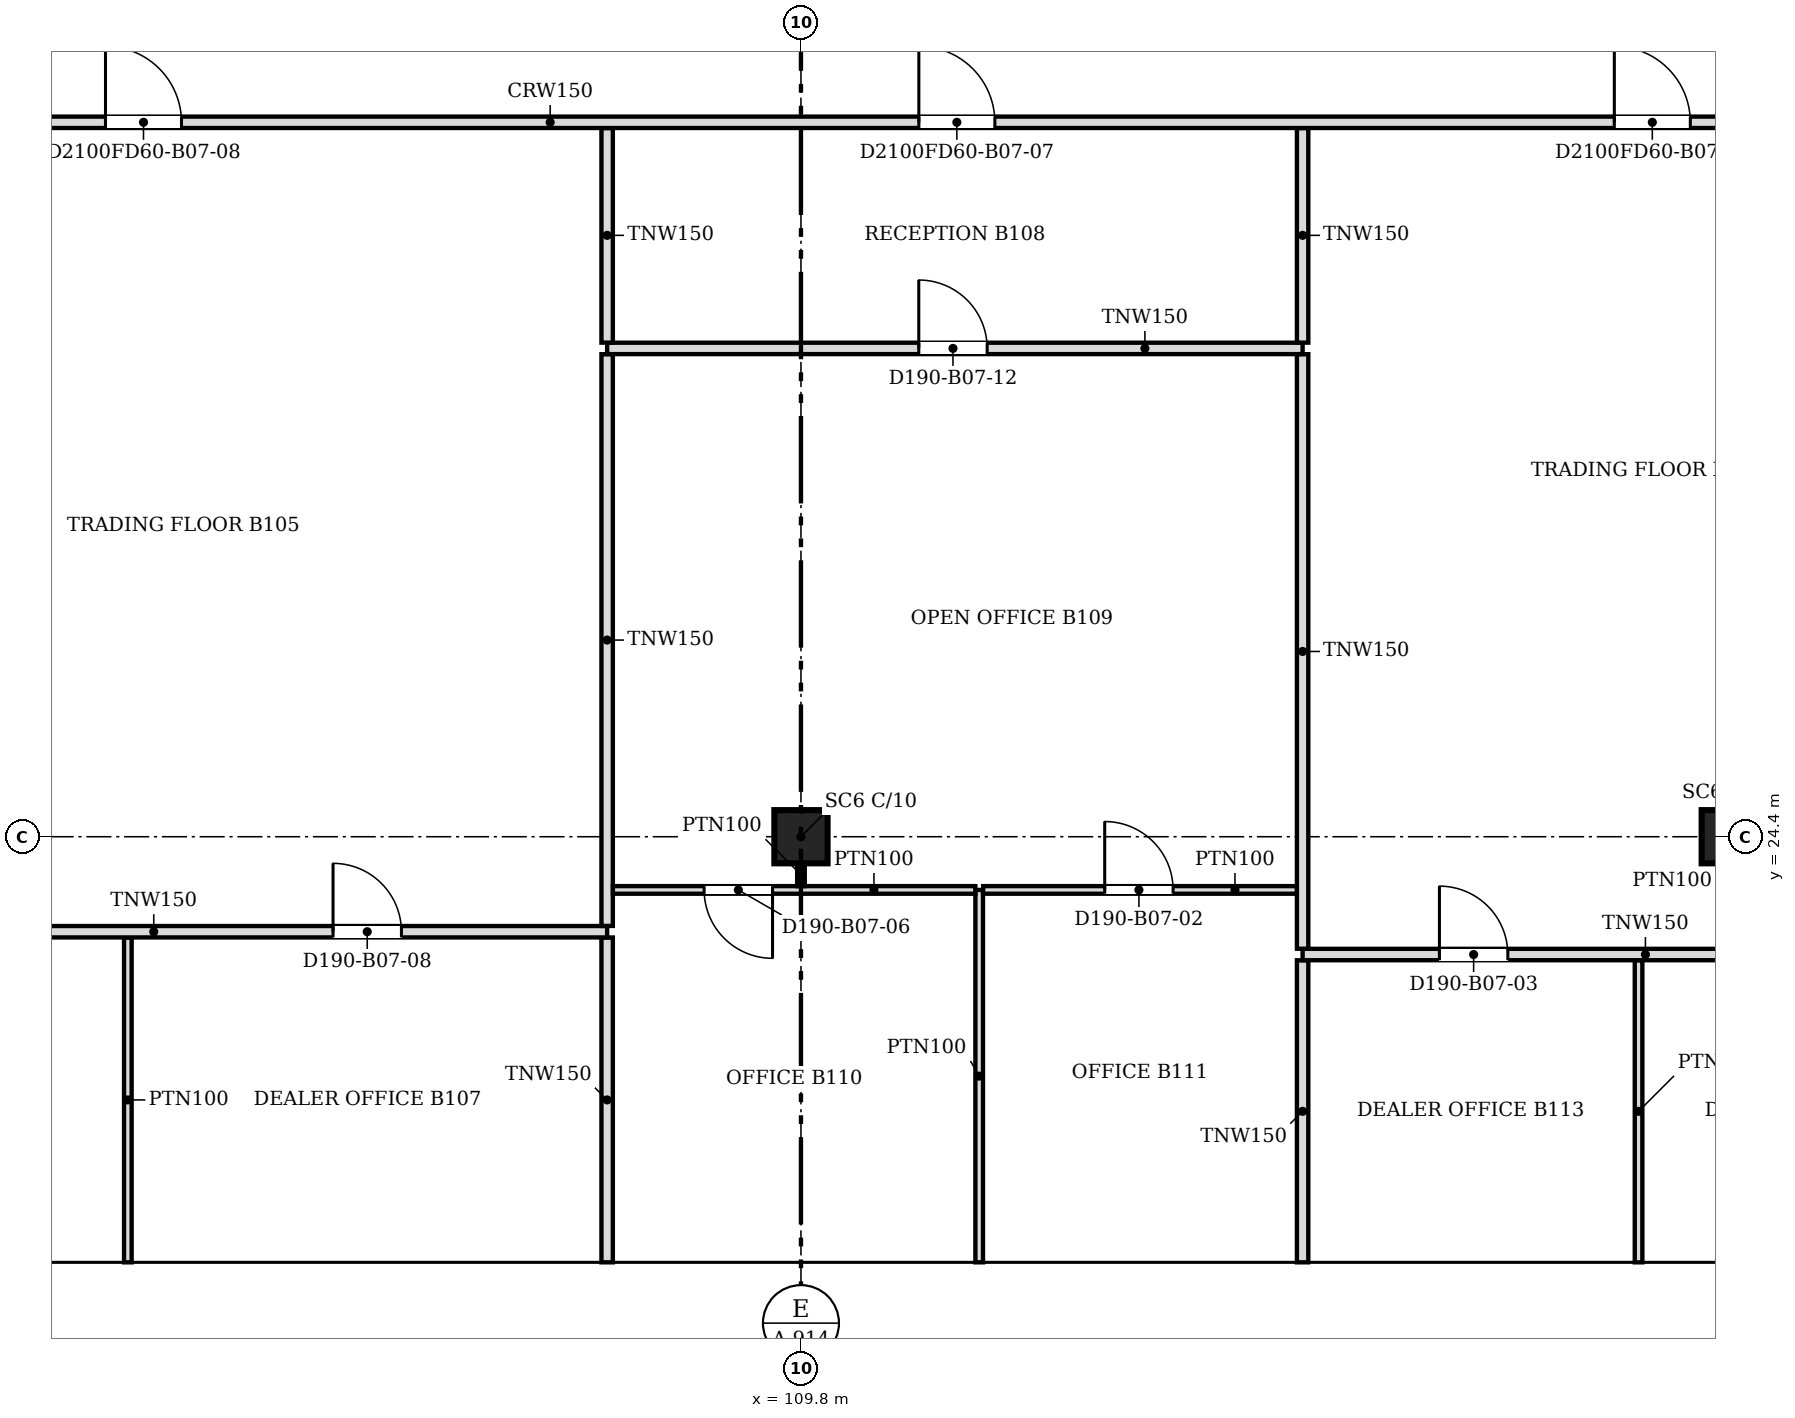
"""IFC4 building model, lengths in metres.
Left out: names, types, materials, properties, quantities, classifications, styles, units other than length and angle.
Written with IfcOpenShell. Run it as: python <this file> out.ifc"""

import sys

from ifc_helpers import new_model, si_unit, direction, frame, frame_2d, origin, origin_2d, place, context, subcontext, project, spatial, polyline, rectangle, outline, extrude, faceted_brep, source, transform, mapped, element, fill, save


model = new_model("IFC4")
c1 = context("Model", 3, precision=1e-05, world=origin(), true_north=direction((0.0, 1.0)))
c2 = subcontext(c1, "Body", "Model", "MODEL_VIEW")
j1 = project(units=[si_unit("LENGTHUNIT", "METRE"), si_unit("PLANEANGLEUNIT", "RADIAN")], contexts=[c1])
p1 = place(None, origin())
s1 = spatial("IfcSite", under=j1, at=p1, CompositionType="ELEMENT")
p2 = place(p1, origin())
s2 = spatial("IfcBuilding", under=s1, at=p2, CompositionType="ELEMENT")
p3 = place(p2, frame((0.0, 0.0, 68.6)))
s3 = spatial("IfcBuildingStorey", under=s2, at=p3, CompositionType="ELEMENT", Elevation=68.6)
for number, where, z_axis, x_axis in (
    (1, (109.8, 24.4, 0.0), (0.0, 0.0, 1.0), (1.0, 0.0, 0.0)),
    (2, (122.0, 24.4, 0.0), (0.0, 0.0, 1.0), (1.0, 0.0, 0.0)),
):
    element("IfcColumn", number, at=place(p3, frame(where, z_axis=z_axis, x_axis=x_axis)), inside=s3, PredefinedType="COLUMN", context=c2, shape_type="SweptSolid", body=[
        extrude(rectangle(XDim=0.7, YDim=0.7, at=origin_2d()), origin(), (0.0, 0.0, 1.0), 3.6),
    ])
m1 = source(origin(), c2, "Body", "Brep", [
    faceted_brep([(6.1, -0.25, 0.0), (3.05, -0.25, 3.8), (0.0, -0.25, 0.0), (6.1, -0.25, 0.0), (0.0, 0.25, 0.0), (3.05, 0.25, 3.8), (6.1, 0.25, 0.0), (6.1, 0.25, 0.0)], [[[0, 1, 2, 3]], [[4, 5, 6, 7]], [[6, 5, 1, 0]], [[5, 4, 2, 1]], [[4, 7, 3, 2]], [[3, 7, 6, 0]]]),
])
p4 = place(p3, frame((94.55, 18.55, 0.0), z_axis=(0.0, 0.0, 1.0), x_axis=(1.0, 0.0, 0.0)))
e3 = element("IfcWall", 3, at=p4, inside=s3, PredefinedType="SOLIDWALL", context=c2, shape_type="MappedRepresentation", body=[
    mapped(m1, transform((0.0, 0.0, 0.0), scale=1.0)),
])
m2 = source(origin(), c2, "Body", "SweptSolid", [
    extrude(outline(polyline([(5.579, 0.25), (3.05, 3.4), (0.521, 0.25), (5.579, 0.25)])), frame((0.0, 0.26, 0.0), z_axis=(0.0, -1.0, 0.0), x_axis=(1.0, 0.0, 0.0)), (0.0, 0.0, 1.0), 0.52),
])
p5 = place(p4, origin())
e4 = element("IfcOpeningElement", 4, at=p5, cuts=e3, PredefinedType="OPENING", context=c2, shape_type="MappedRepresentation", body=[
    mapped(m2, transform((0.0, 0.0, 0.0), scale=1.0)),
])
m3 = source(origin(), c2, "Body", "SweptSolid", [
    extrude(outline(polyline([(6.1, 0.0), (3.05, 3.8), (0.0, 0.0), (6.1, 0.0)])), frame((0.0, 0.25, 0.0), z_axis=(0.0, -1.0, 0.0), x_axis=(1.0, 0.0, 0.0)), (0.0, 0.0, 1.0), 0.5),
])
p6 = place(p3, frame((100.65, 18.55, 0.0), z_axis=(0.0, 0.0, 1.0), x_axis=(1.0, 0.0, 0.0)))
e5 = element("IfcWall", 5, at=p6, inside=s3, PredefinedType="SOLIDWALL", context=c2, shape_type="MappedRepresentation", body=[
    mapped(m3, transform((0.0, 0.0, 0.0), scale=1.0)),
])
p7 = place(p6, origin())
e6 = element("IfcOpeningElement", 6, at=p7, cuts=e5, PredefinedType="OPENING", context=c2, shape_type="MappedRepresentation", body=[
    mapped(m2, transform((0.0, 0.0, 0.0), scale=1.0)),
])
p8 = place(p3, frame((106.75, 18.55, 0.0), z_axis=(0.0, 0.0, 1.0), x_axis=(1.0, 0.0, 0.0)))
e7 = element("IfcWall", 7, at=p8, inside=s3, PredefinedType="SOLIDWALL", context=c2, shape_type="MappedRepresentation", body=[
    mapped(m3, transform((0.0, 0.0, 0.0), scale=1.0)),
])
p9 = place(p8, origin())
e8 = element("IfcOpeningElement", 8, at=p9, cuts=e7, PredefinedType="OPENING", context=c2, shape_type="MappedRepresentation", body=[
    mapped(m2, transform((0.0, 0.0, 0.0), scale=1.0)),
])
p10 = place(p3, frame((112.85, 18.55, 0.0), z_axis=(0.0, 0.0, 1.0), x_axis=(1.0, 0.0, 0.0)))
e9 = element("IfcWall", 9, at=p10, inside=s3, PredefinedType="SOLIDWALL", context=c2, shape_type="MappedRepresentation", body=[
    mapped(m1, transform((0.0, 0.0, 0.0), scale=1.0)),
])
p11 = place(p10, origin())
e10 = element("IfcOpeningElement", 10, at=p11, cuts=e9, PredefinedType="OPENING", context=c2, shape_type="MappedRepresentation", body=[
    mapped(m2, transform((0.0, 0.0, 0.0), scale=1.0)),
])
p12 = place(p3, frame((118.95, 18.55, 0.0), z_axis=(0.0, 0.0, 1.0), x_axis=(1.0, 0.0, 0.0)))
e11 = element("IfcWall", 11, at=p12, inside=s3, PredefinedType="SOLIDWALL", context=c2, shape_type="MappedRepresentation", body=[
    mapped(m3, transform((0.0, 0.0, 0.0), scale=1.0)),
])
p13 = place(p12, origin())
e12 = element("IfcOpeningElement", 12, at=p13, cuts=e11, PredefinedType="OPENING", context=c2, shape_type="MappedRepresentation", body=[
    mapped(m2, transform((0.0, 0.0, 0.0), scale=1.0)),
])
p14 = place(p2, frame((0.0, 0.0, 72.4)))
s4 = spatial("IfcBuildingStorey", under=s2, at=p14, CompositionType="ELEMENT", Elevation=72.4)
m4 = source(origin(), c2, "Body", "Brep", [
    faceted_brep([(3.05, -0.25, 0.0), (6.1, -0.25, 3.8), (6.1, -0.25, 3.8), (3.05, -0.25, 7.6), (0.0, -0.25, 3.8), (0.0, 0.25, 3.8), (3.05, 0.25, 7.6), (6.1, 0.25, 3.8), (6.1, 0.25, 3.8), (3.05, 0.25, 0.0)], [[[0, 1, 2, 3, 4]], [[5, 6, 7, 8, 9]], [[9, 8, 1, 0]], [[7, 6, 3, 2]], [[6, 5, 4, 3]], [[5, 9, 0, 4]], [[1, 8, 7, 2]]]),
])
p15 = place(p14, frame((97.6, 18.55, -3.8), z_axis=(0.0, 0.0, 1.0), x_axis=(1.0, 0.0, 0.0)))
e13 = element("IfcWall", 13, at=p15, inside=s4, PredefinedType="SOLIDWALL", context=c2, shape_type="MappedRepresentation", body=[
    mapped(m4, transform((0.0, 0.0, 0.0), scale=1.0)),
])
m5 = source(origin(), c2, "Body", "SweptSolid", [
    extrude(outline(polyline([(3.05, 0.399), (5.78, 3.8), (3.05, 7.2), (0.321, 3.8), (3.05, 0.399)])), frame((0.0, 0.26, 0.0), z_axis=(0.0, -1.0, 0.0), x_axis=(1.0, 0.0, 0.0)), (0.0, 0.0, 1.0), 0.52),
])
p16 = place(p15, origin())
e14 = element("IfcOpeningElement", 14, at=p16, cuts=e13, PredefinedType="OPENING", context=c2, shape_type="MappedRepresentation", body=[
    mapped(m5, transform((0.0, 0.0, 0.0), scale=1.0)),
])
m6 = source(origin(), c2, "Body", "SweptSolid", [
    extrude(outline(polyline([(3.05, 0.0), (6.1, 3.8), (3.05, 7.6), (0.0, 3.8), (3.05, 0.0)])), frame((0.0, 0.25, 0.0), z_axis=(0.0, -1.0, 0.0), x_axis=(1.0, 0.0, 0.0)), (0.0, 0.0, 1.0), 0.5),
])
p17 = place(p14, frame((103.7, 18.55, -3.8), z_axis=(0.0, 0.0, 1.0), x_axis=(1.0, 0.0, 0.0)))
e15 = element("IfcWall", 15, at=p17, inside=s4, PredefinedType="SOLIDWALL", context=c2, shape_type="MappedRepresentation", body=[
    mapped(m6, transform((0.0, 0.0, 0.0), scale=1.0)),
])
p18 = place(p17, origin())
e16 = element("IfcOpeningElement", 16, at=p18, cuts=e15, PredefinedType="OPENING", context=c2, shape_type="MappedRepresentation", body=[
    mapped(m5, transform((0.0, 0.0, 0.0), scale=1.0)),
])
p19 = place(p14, frame((109.8, 18.55, -3.8), z_axis=(0.0, 0.0, 1.0), x_axis=(1.0, 0.0, 0.0)))
e17 = element("IfcWall", 17, at=p19, inside=s4, PredefinedType="SOLIDWALL", context=c2, shape_type="MappedRepresentation", body=[
    mapped(m4, transform((0.0, 0.0, 0.0), scale=1.0)),
])
p20 = place(p19, origin())
e18 = element("IfcOpeningElement", 18, at=p20, cuts=e17, PredefinedType="OPENING", context=c2, shape_type="MappedRepresentation", body=[
    mapped(m5, transform((0.0, 0.0, 0.0), scale=1.0)),
])
p21 = place(p14, frame((115.9, 18.55, -3.8), z_axis=(0.0, 0.0, 1.0), x_axis=(1.0, 0.0, 0.0)))
e19 = element("IfcWall", 19, at=p21, inside=s4, PredefinedType="SOLIDWALL", context=c2, shape_type="MappedRepresentation", body=[
    mapped(m6, transform((0.0, 0.0, 0.0), scale=1.0)),
])
p22 = place(p21, origin())
e20 = element("IfcOpeningElement", 20, at=p22, cuts=e19, PredefinedType="OPENING", context=c2, shape_type="MappedRepresentation", body=[
    mapped(m5, transform((0.0, 0.0, 0.0), scale=1.0)),
])
p23 = place(p3, frame((100.944, 18.8, 0.0), z_axis=(0.0, 0.0, 1.0), x_axis=(0.0, 1.0, 0.0)))
e21 = element("IfcWall", 21, at=p23, inside=s3, PredefinedType="PARTITIONING", context=c2, shape_type="SweptSolid", body=[
    extrude(rectangle(XDim=4.274, YDim=0.1, at=frame_2d((2.137, 0.0))), origin(), (0.0, 0.0, 1.0), 3.067),
])
p24 = place(p3, frame((107.25, 18.8, 0.0), z_axis=(0.0, 0.0, 1.0), x_axis=(0.0, 1.0, 0.0)))
e22 = element("IfcWall", 22, at=p24, inside=s3, PredefinedType="PARTITIONING", context=c2, shape_type="SweptSolid", body=[
    extrude(rectangle(XDim=4.274, YDim=0.15, at=frame_2d((2.137, 0.0))), origin(), (0.0, 0.0, 1.0), 3.067),
])
p25 = place(p3, frame((112.145, 18.8, 0.0), z_axis=(0.0, 0.0, 1.0), x_axis=(0.0, 1.0, 0.0)))
e23 = element("IfcWall", 23, at=p25, inside=s3, PredefinedType="PARTITIONING", context=c2, shape_type="SweptSolid", body=[
    extrude(rectangle(XDim=4.9, YDim=0.1, at=frame_2d((2.45, 0.0))), origin(), (0.0, 0.0, 1.0), 3.067),
])
p26 = place(p3, frame((116.4, 18.8, 0.0), z_axis=(0.0, 0.0, 1.0), x_axis=(0.0, 1.0, 0.0)))
e24 = element("IfcWall", 24, at=p26, inside=s3, PredefinedType="PARTITIONING", context=c2, shape_type="SweptSolid", body=[
    extrude(rectangle(XDim=3.974, YDim=0.15, at=frame_2d((1.987, 0.0))), origin(), (0.0, 0.0, 1.0), 3.067),
])
p27 = place(p3, frame((120.82, 18.8, 0.0), z_axis=(0.0, 0.0, 1.0), x_axis=(0.0, 1.0, 0.0)))
e25 = element("IfcWall", 25, at=p27, inside=s3, PredefinedType="PARTITIONING", context=c2, shape_type="SweptSolid", body=[
    extrude(rectangle(XDim=3.974, YDim=0.1, at=frame_2d((1.987, 0.0))), origin(), (0.0, 0.0, 1.0), 3.067),
])
p28 = place(p3, frame((125.55, 22.85, 0.0), z_axis=(0.0, 0.0, 1.0), x_axis=(-1.0, 0.0, 0.0)))
e26 = element("IfcWall", 26, at=p28, inside=s3, PredefinedType="PARTITIONING", context=c2, shape_type="SweptSolid", body=[
    extrude(rectangle(XDim=9.15, YDim=0.15, at=frame_2d((4.575, 0.0))), origin(), (0.0, 0.0, 1.0), 3.067),
])
m7 = source(origin(), c2, "Body", "SweptSolid", [
    extrude(rectangle(XDim=0.9, YDim=2.1, at=frame_2d((0.45, 1.05))), frame((0.0, 0.085, 0.0), z_axis=(0.0, -1.0, 0.0), x_axis=(1.0, 0.0, 0.0)), (0.0, 0.0, 1.0), 0.17),
])
p29 = place(p28, frame((6.45, 0.0, 0.0)))
e27 = element("IfcOpeningElement", 27, at=p29, cuts=e26, PredefinedType="OPENING", context=c2, shape_type="MappedRepresentation", body=[
    mapped(m7, transform((0.0, 0.0, 0.0), scale=1.0)),
])
p30 = place(p28, frame((1.93, 0.0, 0.0)))
e28 = element("IfcOpeningElement", 28, at=p30, cuts=e26, PredefinedType="OPENING", context=c2, shape_type="MappedRepresentation", body=[
    mapped(m7, transform((0.0, 0.0, 0.0), scale=1.0)),
])
p31 = place(p3, frame((116.4, 22.926, 0.0), z_axis=(0.0, 0.0, 1.0), x_axis=(0.0, 1.0, 0.0)))
e29 = element("IfcWall", 29, at=p31, inside=s3, PredefinedType="PARTITIONING", context=c2, shape_type="SweptSolid", body=[
    extrude(rectangle(XDim=7.823, YDim=0.15, at=frame_2d((3.912, 0.0))), origin(), (0.0, 0.0, 1.0), 3.067),
])
p32 = place(p3, frame((107.25, 23.15, 0.0), z_axis=(0.0, 0.0, 1.0), x_axis=(-1.0, 0.0, 0.0)))
e30 = element("IfcWall", 30, at=p32, inside=s3, PredefinedType="PARTITIONING", context=c2, shape_type="SweptSolid", body=[
    extrude(rectangle(XDim=12.124, YDim=0.15, at=frame_2d((6.062, 0.0))), origin(), (0.0, 0.0, 1.0), 3.067),
])
p33 = place(p32, frame((8.324, 0.0, 0.0)))
e31 = element("IfcOpeningElement", 31, at=p33, cuts=e30, PredefinedType="OPENING", context=c2, shape_type="MappedRepresentation", body=[
    mapped(m7, transform((0.0, 0.0, 0.0), scale=1.0)),
])
p34 = place(p32, frame((2.706, 0.0, 0.0)))
e32 = element("IfcOpeningElement", 32, at=p34, cuts=e30, PredefinedType="OPENING", context=c2, shape_type="MappedRepresentation", body=[
    mapped(m7, transform((0.0, 0.0, 0.0), scale=1.0)),
])
p35 = place(p3, frame((107.25, 23.226, 0.0), z_axis=(0.0, 0.0, 1.0), x_axis=(0.0, 1.0, 0.0)))
e33 = element("IfcWall", 33, at=p35, inside=s3, PredefinedType="PARTITIONING", context=c2, shape_type="SweptSolid", body=[
    extrude(rectangle(XDim=7.523, YDim=0.15, at=frame_2d((3.761, 0.0))), origin(), (0.0, 0.0, 1.0), 3.067),
])
p36 = place(p3, frame((112.094, 23.7, 0.0), z_axis=(0.0, 0.0, 1.0), x_axis=(-1.0, 0.0, 0.0)))
e34 = element("IfcWall", 34, at=p36, inside=s3, PredefinedType="PARTITIONING", context=c2, shape_type="SweptSolid", body=[
    extrude(rectangle(XDim=4.768, YDim=0.1, at=frame_2d((2.384, 0.0))), origin(), (0.0, 0.0, 1.0), 3.067),
])
m8 = source(origin(), c2, "Body", "SweptSolid", [
    extrude(rectangle(XDim=0.9, YDim=2.1, at=frame_2d((0.45, 1.05))), frame((0.0, 0.06, 0.0), z_axis=(0.0, -1.0, 0.0), x_axis=(1.0, 0.0, 0.0)), (0.0, 0.0, 1.0), 0.12),
])
p37 = place(p36, frame((2.668, 0.0, 0.0)))
e35 = element("IfcOpeningElement", 35, at=p37, cuts=e34, PredefinedType="OPENING", context=c2, shape_type="MappedRepresentation", body=[
    mapped(m8, transform((0.0, 0.0, 0.0), scale=1.0)),
])
p38 = place(p3, frame((116.324, 23.7, 0.0), z_axis=(0.0, 0.0, 1.0), x_axis=(-1.0, 0.0, 0.0)))
e36 = element("IfcWall", 36, at=p38, inside=s3, PredefinedType="PARTITIONING", context=c2, shape_type="SweptSolid", body=[
    extrude(rectangle(XDim=4.128, YDim=0.1, at=frame_2d((2.064, 0.0))), origin(), (0.0, 0.0, 1.0), 3.067),
])
p39 = place(p38, frame((1.628, 0.0, 0.0)))
e37 = element("IfcOpeningElement", 37, at=p39, cuts=e36, PredefinedType="OPENING", context=c2, shape_type="MappedRepresentation", body=[
    mapped(m8, transform((0.0, 0.0, 0.0), scale=1.0)),
])
p40 = place(p3, frame((109.8, 24.05, 0.0), z_axis=(0.0, 0.0, 1.0), x_axis=(0.0, -1.0, 0.0)))
e38 = element("IfcWall", 38, at=p40, inside=s3, PredefinedType="PARTITIONING", context=c2, shape_type="SweptSolid", body=[
    extrude(rectangle(XDim=0.3, YDim=0.1, at=frame_2d((0.15, 0.0))), origin(), (0.0, 0.0, 1.0), 3.067),
])
p41 = place(p3, frame((116.4, 30.825, 0.0), z_axis=(0.0, 0.0, 1.0), x_axis=(-1.0, 0.0, 0.0)))
e39 = element("IfcWall", 39, at=p41, inside=s3, PredefinedType="PARTITIONING", context=c2, shape_type="SweptSolid", body=[
    extrude(rectangle(XDim=9.15, YDim=0.15, at=frame_2d((4.575, 0.0))), origin(), (0.0, 0.0, 1.0), 3.067),
])
p42 = place(p41, frame((4.15, 0.0, 0.0)))
e40 = element("IfcOpeningElement", 40, at=p42, cuts=e39, PredefinedType="OPENING", context=c2, shape_type="MappedRepresentation", body=[
    mapped(m7, transform((0.0, 0.0, 0.0), scale=1.0)),
])
for number, where, z_axis, x_axis in (
    (41, (107.25, 30.901, 0.0), (0.0, 0.0, 1.0), (0.0, 1.0, 0.0)),
    (42, (116.4, 30.901, 0.0), (0.0, 0.0, 1.0), (0.0, 1.0, 0.0)),
):
    element("IfcWall", number, at=place(p3, frame(where, z_axis=z_axis, x_axis=x_axis)), inside=s3, PredefinedType="PARTITIONING", context=c2, shape_type="SweptSolid", body=[
        extrude(rectangle(XDim=2.823, YDim=0.15, at=frame_2d((1.412, 0.0))), origin(), (0.0, 0.0, 1.0), 3.067),
    ])
p43 = place(p3, frame((133.7, 33.8, 0.0), z_axis=(0.0, 0.0, 1.0), x_axis=(-1.0, 0.0, 0.0)))
e43 = element("IfcWall", 43, at=p43, inside=s3, PredefinedType="PARTITIONING", context=c2, shape_type="SweptSolid", body=[
    extrude(rectangle(XDim=47.8, YDim=0.15, at=frame_2d((23.9, 0.0))), origin(), (0.0, 0.0, 1.0), 3.067),
])
m9 = source(origin(), c2, "Body", "SweptSolid", [
    extrude(rectangle(XDim=1.0, YDim=2.1, at=frame_2d((0.5, 1.05))), frame((0.0, 0.085, 0.0), z_axis=(0.0, -1.0, 0.0), x_axis=(1.0, 0.0, 0.0)), (0.0, 0.0, 1.0), 0.17),
])
p44 = place(p43, frame((3.549, 0.0, 0.0)))
e44 = element("IfcOpeningElement", 44, at=p44, cuts=e43, PredefinedType="OPENING", context=c2, shape_type="MappedRepresentation", body=[
    mapped(m9, transform((0.0, 0.0, 0.0), scale=1.0)),
])
p45 = place(p43, frame((42.7, 0.0, 0.0)))
e45 = element("IfcOpeningElement", 45, at=p45, cuts=e43, PredefinedType="OPENING", context=c2, shape_type="MappedRepresentation", body=[
    mapped(m9, transform((0.0, 0.0, 0.0), scale=1.0)),
])
p46 = place(p43, frame((12.199, 0.0, 0.0)))
e46 = element("IfcOpeningElement", 46, at=p46, cuts=e43, PredefinedType="OPENING", context=c2, shape_type="MappedRepresentation", body=[
    mapped(m9, transform((0.0, 0.0, 0.0), scale=1.0)),
])
p47 = place(p43, frame((21.349, 0.0, 0.0)))
e47 = element("IfcOpeningElement", 47, at=p47, cuts=e43, PredefinedType="OPENING", context=c2, shape_type="MappedRepresentation", body=[
    mapped(m9, transform((0.0, 0.0, 0.0), scale=1.0)),
])
p48 = place(p43, frame((32.05, 0.0, 0.0)))
e48 = element("IfcOpeningElement", 48, at=p48, cuts=e43, PredefinedType="OPENING", context=c2, shape_type="MappedRepresentation", body=[
    mapped(m9, transform((0.0, 0.0, 0.0), scale=1.0)),
])
m10 = source(origin(), c2, "Body", "SweptSolid", [
    extrude(rectangle(XDim=0.9, YDim=2.1, at=frame_2d((0.45, 1.05))), frame((0.0, 0.025, 0.0), z_axis=(0.0, -1.0, 0.0), x_axis=(1.0, 0.0, 0.0)), (0.0, 0.0, 1.0), 0.05),
])
p49 = place(p39, origin())
e49 = element("IfcDoor", 49, at=p49, inside=s3, OperationType="SINGLE_SWING_RIGHT", PredefinedType="DOOR", context=c2, shape_type="MappedRepresentation", body=[
    mapped(m10, transform((0.0, 0.0, 0.0), scale=1.0)),
])
fill(e37, e49)
p50 = place(p29, origin())
e50 = element("IfcDoor", 50, at=p50, inside=s3, OperationType="SINGLE_SWING_RIGHT", PredefinedType="DOOR", context=c2, shape_type="MappedRepresentation", body=[
    mapped(m10, transform((0.0, 0.0, 0.0), scale=1.0)),
])
fill(e27, e50)
p51 = place(p37, origin())
e51 = element("IfcDoor", 51, at=p51, inside=s3, OperationType="SINGLE_SWING_LEFT", PredefinedType="DOOR", context=c2, shape_type="MappedRepresentation", body=[
    mapped(m10, transform((0.0, 0.0, 0.0), scale=1.0)),
])
fill(e35, e51)
p52 = place(p34, origin())
e52 = element("IfcDoor", 52, at=p52, inside=s3, OperationType="SINGLE_SWING_RIGHT", PredefinedType="DOOR", context=c2, shape_type="MappedRepresentation", body=[
    mapped(m10, transform((0.0, 0.0, 0.0), scale=1.0)),
])
fill(e32, e52)
m11 = source(origin(), c2, "Body", "SweptSolid", [
    extrude(rectangle(XDim=1.0, YDim=2.1, at=frame_2d((0.5, 1.05))), frame((0.0, 0.025, 0.0), z_axis=(0.0, -1.0, 0.0), x_axis=(1.0, 0.0, 0.0)), (0.0, 0.0, 1.0), 0.05),
])
p53 = place(p46, origin())
e53 = element("IfcDoor", 53, at=p53, inside=s3, OperationType="SINGLE_SWING_RIGHT", PredefinedType="DOOR", context=c2, shape_type="MappedRepresentation", body=[
    mapped(m11, transform((0.0, 0.0, 0.0), scale=1.0)),
])
fill(e46, e53)
p54 = place(p47, origin())
e54 = element("IfcDoor", 54, at=p54, inside=s3, OperationType="SINGLE_SWING_RIGHT", PredefinedType="DOOR", context=c2, shape_type="MappedRepresentation", body=[
    mapped(m11, transform((0.0, 0.0, 0.0), scale=1.0)),
])
fill(e47, e54)
p55 = place(p42, origin())
e55 = element("IfcDoor", 55, at=p55, inside=s3, OperationType="SINGLE_SWING_RIGHT", PredefinedType="DOOR", context=c2, shape_type="MappedRepresentation", body=[
    mapped(m10, transform((0.0, 0.0, 0.0), scale=1.0)),
])
fill(e40, e55)
p56 = place(p48, origin())
e56 = element("IfcDoor", 56, at=p56, inside=s3, OperationType="SINGLE_SWING_RIGHT", PredefinedType="DOOR", context=c2, shape_type="MappedRepresentation", body=[
    mapped(m11, transform((0.0, 0.0, 0.0), scale=1.0)),
])
fill(e48, e56)
save(model, sys.argv[1])
